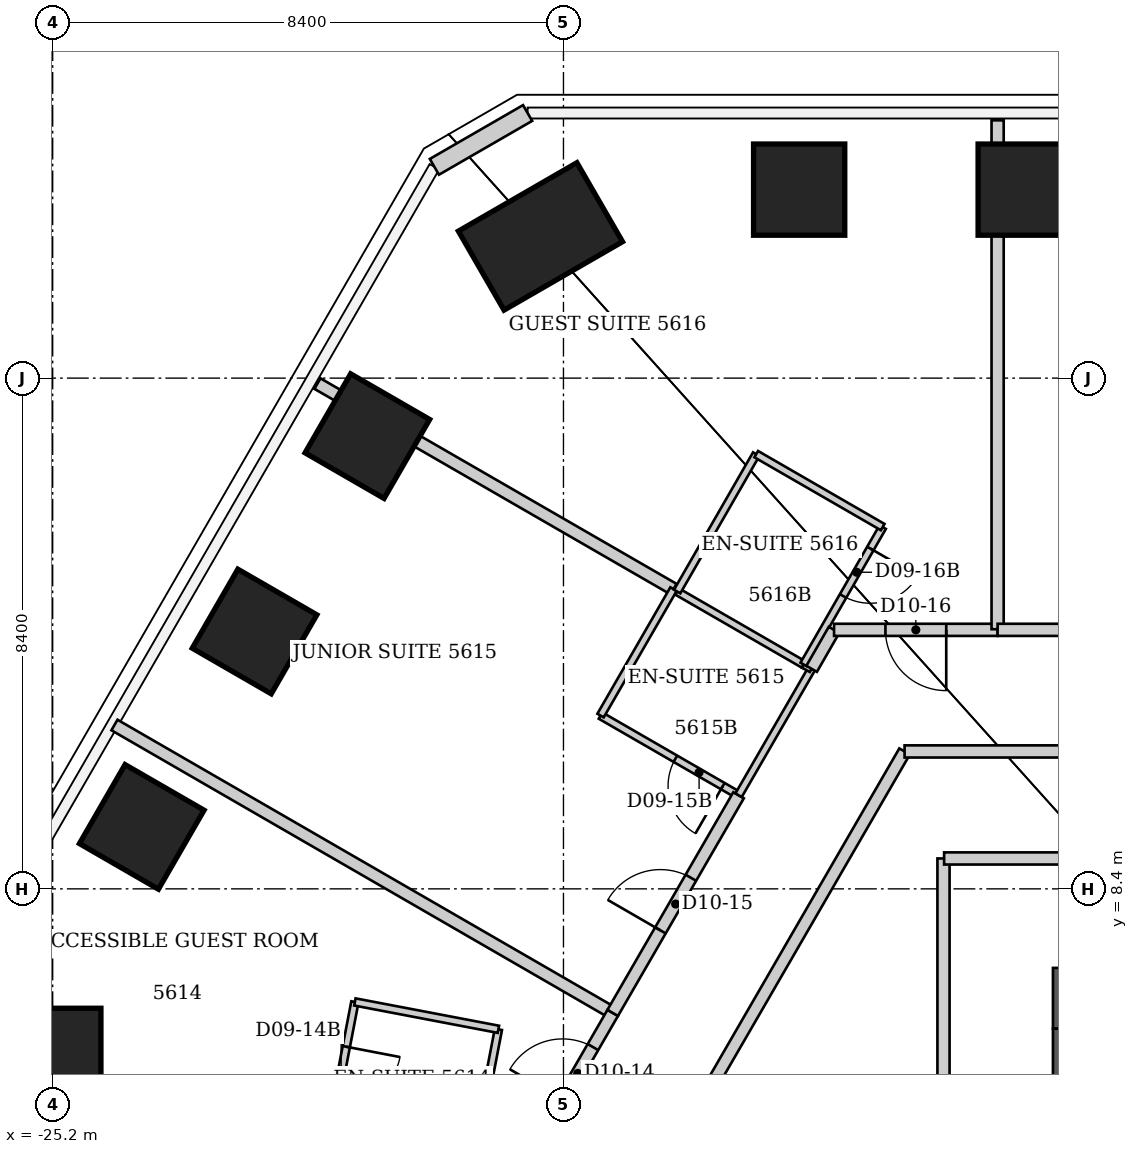
"""IFC4 building model, lengths in metres.
Left out: names, types, materials, properties, quantities, classifications, styles, units other than length and angle.
Written with IfcOpenShell. Run it as: python <this file> out.ifc"""

import sys

from ifc_helpers import new_model, si_unit, direction, frame, frame_2d, origin, origin_2d, place, context, subcontext, project, spatial, rectangle, extrude, element, fill, save


model = new_model("IFC4")
c1 = context("Model", 3, precision=1e-05, world=origin(), true_north=direction((0.0, 1.0)))
c2 = subcontext(c1, "Body", "Model", "MODEL_VIEW")
j1 = project(units=[si_unit("LENGTHUNIT", "METRE"), si_unit("PLANEANGLEUNIT", "RADIAN")], contexts=[c1])
p1 = place(None, origin())
s1 = spatial("IfcSite", under=j1, at=p1, CompositionType="ELEMENT")
p2 = place(p1, origin())
s2 = spatial("IfcBuilding", under=s1, at=p2, CompositionType="ELEMENT")
p3 = place(p2, frame((0.0, 0.0, 225.0)))
s3 = spatial("IfcBuildingStorey", under=s2, at=p3, CompositionType="ELEMENT", Elevation=225.0)
for number, where, z_axis, x_axis in (
    (1, (-12.924, 19.9, 0.0), (0.0, 0.0, 1.0), (0.0, 1.0, 0.0)),
    (2, (-9.231, 19.9, 0.0), (0.0, 0.0, 1.0), (0.0, 1.0, 0.0)),
):
    element("IfcColumn", number, at=place(p3, frame(where, z_axis=z_axis, x_axis=x_axis)), inside=s3, PredefinedType="COLUMN", context=c2, shape_type="SweptSolid", body=[
        extrude(rectangle(XDim=1.5, YDim=1.5, at=origin_2d()), origin(), (0.0, 0.0, 1.0), 3.8),
    ])
p4 = place(p3, frame((-25.156, 5.311, 0.0), z_axis=(0.0, 0.0, 1.0), x_axis=(-1.0, 0.0, 0.0)))
e3 = element("IfcColumn", 3, at=p4, inside=s3, PredefinedType="COLUMN", context=c2, shape_type="SweptSolid", body=[
    extrude(rectangle(XDim=1.5, YDim=2.25, at=origin_2d()), origin(), (0.0, 0.0, 1.0), 3.8),
])
for number, where, z_axis, x_axis in (
    (4, (-23.735, 9.419, 0.0), (0.0, 0.0, 1.0), (-0.866, 0.5, 0.0)),
    (5, (-21.88, 12.633, 0.0), (0.0, 0.0, 1.0), (-0.866, 0.5, 0.0)),
    (6, (-20.025, 15.846, 0.0), (0.0, 0.0, 1.0), (-0.866, 0.5, 0.0)),
):
    element("IfcColumn", number, at=place(p3, frame(where, z_axis=z_axis, x_axis=x_axis)), inside=s3, PredefinedType="COLUMN", context=c2, shape_type="SweptSolid", body=[
        extrude(rectangle(XDim=1.5, YDim=1.5, at=origin_2d()), origin(), (0.0, 0.0, 1.0), 3.8),
    ])
p5 = place(p3, frame((-17.178, 19.131, 0.0), z_axis=(0.0, 0.0, 1.0), x_axis=(-0.5, 0.866025403784, 0.0)))
e7 = element("IfcColumn", 7, at=p5, inside=s3, PredefinedType="COLUMN", context=c2, shape_type="SweptSolid", body=[
    extrude(rectangle(XDim=1.5, YDim=2.25, at=origin_2d()), origin(), (0.0, 0.0, 1.0), 3.8),
])
p6 = place(p3, frame((-8.75, 6.6, 0.0), z_axis=(0.0, 0.0, 1.0), x_axis=(1.0, 0.0, 0.0)))
e8 = element("IfcWall", 8, at=p6, inside=s3, PredefinedType="SHEAR", context=c2, shape_type="SweptSolid", body=[
    extrude(rectangle(XDim=17.5, YDim=1.0, at=frame_2d((8.75, 0.0))), origin(), (0.0, 0.0, 1.0), 3.8),
])
p7 = place(p6, frame((6.887, 0.0, 0.0)))
e9 = element("IfcOpeningElement", 9, at=p7, cuts=e8, PredefinedType="OPENING", context=c2, shape_type="SweptSolid", body=[
    extrude(rectangle(XDim=1.1, YDim=2.1, at=frame_2d((0.55, 1.05))), frame((0.0, 0.5, 0.0), z_axis=(0.0, -1.0, 0.0), x_axis=(1.0, 0.0, 0.0)), (0.0, 0.0, 1.0), 1.0),
])
p8 = place(p6, frame((9.512, 0.0, 0.0)))
e10 = element("IfcOpeningElement", 10, at=p8, cuts=e8, PredefinedType="OPENING", context=c2, shape_type="SweptSolid", body=[
    extrude(rectangle(XDim=1.1, YDim=2.1, at=frame_2d((0.55, 1.05))), frame((0.0, 0.5, 0.0), z_axis=(0.0, -1.0, 0.0), x_axis=(1.0, 0.0, 0.0)), (0.0, 0.0, 1.0), 1.0),
])
p9 = place(p6, frame((12.137, 0.0, 0.0)))
e11 = element("IfcOpeningElement", 11, at=p9, cuts=e8, PredefinedType="OPENING", context=c2, shape_type="SweptSolid", body=[
    extrude(rectangle(XDim=1.1, YDim=2.1, at=frame_2d((0.55, 1.05))), frame((0.0, 0.5, 0.0), z_axis=(0.0, -1.0, 0.0), x_axis=(1.0, 0.0, 0.0)), (0.0, 0.0, 1.0), 1.0),
])
p10 = place(p6, frame((14.762, 0.0, 0.0)))
e12 = element("IfcOpeningElement", 12, at=p10, cuts=e8, PredefinedType="OPENING", context=c2, shape_type="SweptSolid", body=[
    extrude(rectangle(XDim=1.1, YDim=2.1, at=frame_2d((0.55, 1.05))), frame((0.0, 0.5, 0.0), z_axis=(0.0, -1.0, 0.0), x_axis=(1.0, 0.0, 0.0)), (0.0, 0.0, 1.0), 1.0),
])
p11 = place(p3, frame((-8.25, -6.1, 0.0), z_axis=(0.0, 0.0, 1.0), x_axis=(0.0, 1.0, 0.0)))
e13 = element("IfcWall", 13, at=p11, inside=s3, PredefinedType="SHEAR", context=c2, shape_type="SweptSolid", body=[
    extrude(rectangle(XDim=12.2, YDim=1.0, at=frame_2d((6.1, 0.0))), origin(), (0.0, 0.0, 1.0), 3.8),
])
p12 = place(p11, frame((7.6, 0.0, 0.0)))
e14 = element("IfcOpeningElement", 14, at=p12, cuts=e13, PredefinedType="OPENING", context=c2, shape_type="SweptSolid", body=[
    extrude(rectangle(XDim=1.2, YDim=2.2, at=frame_2d((0.6, 1.1))), frame((0.0, 0.5, 0.0), z_axis=(0.0, -1.0, 0.0), x_axis=(1.0, 0.0, 0.0)), (0.0, 0.0, 1.0), 1.0),
])
p13 = place(p3, frame((-18.923, 20.275, 0.0), z_axis=(0.0, 0.0, 1.0), x_axis=(0.866036293601, 0.499981137809, 0.0)))
e15 = element("IfcWall", 15, at=p13, inside=s3, PredefinedType="SOLIDWALL", context=c2, shape_type="SweptSolid", body=[
    extrude(rectangle(XDim=1.77, YDim=0.3, at=frame_2d((0.885, 0.0))), origin(), (0.0, 0.0, 1.0), 3.64),
])
p14 = place(p3, frame((-24.184, 11.095, 0.0), z_axis=(0.0, 0.0, 1.0), x_axis=(0.865833251631, -0.500332669702, 0.0)))
e16 = element("IfcWall", 16, at=p14, inside=s3, PredefinedType="PARTITIONING", context=c2, shape_type="SweptSolid", body=[
    extrude(rectangle(XDim=9.454, YDim=0.2, at=frame_2d((4.727, 0.0))), origin(), (0.0, 0.0, 1.0), 3.64),
])
p15 = place(p3, frame((-20.846, 16.71, 0.0), z_axis=(0.0, 0.0, 1.0), x_axis=(0.866102018567, -0.499867275818, 0.0)))
e17 = element("IfcWall", 17, at=p15, inside=s3, PredefinedType="PARTITIONING", context=c2, shape_type="SweptSolid", body=[
    extrude(rectangle(XDim=6.761, YDim=0.2, at=frame_2d((3.381, 0.0))), origin(), (0.0, 0.0, 1.0), 3.64),
])
p16 = place(p3, frame((-20.23, 6.54, 0.0), z_axis=(0.0, 0.0, 1.0), x_axis=(-0.188697442844, -0.982035271802, 0.0)))
e18 = element("IfcWall", 18, at=p16, inside=s3, PredefinedType="PARTITIONING", context=c2, shape_type="SweptSolid", body=[
    extrude(rectangle(XDim=2.597, YDim=0.12, at=frame_2d((1.298, 0.0))), origin(), (0.0, 0.0, 1.0), 3.64),
])
p17 = place(p16, frame((0.75, 0.0, 0.0)))
e19 = element("IfcOpeningElement", 19, at=p17, cuts=e18, PredefinedType="OPENING", context=c2, shape_type="SweptSolid", body=[
    extrude(rectangle(XDim=0.9, YDim=2.03, at=frame_2d((0.45, 1.015))), frame((0.0, 0.06, 0.0), z_axis=(0.0, -1.0, 0.0), x_axis=(1.0, 0.0, 0.0)), (0.0, 0.0, 1.0), 0.12),
])
p18 = place(p3, frame((-18.36, 3.54, 0.0), z_axis=(0.0, 0.0, 1.0), x_axis=(0.188788112352, 0.982017845375, 0.0)))
e20 = element("IfcWall", 20, at=p18, inside=s3, PredefinedType="PARTITIONING", context=c2, shape_type="SweptSolid", body=[
    extrude(rectangle(XDim=2.597, YDim=0.12, at=frame_2d((1.298, 0.0))), origin(), (0.0, 0.0, 1.0), 3.64),
])
p19 = place(p3, frame((-17.87, 6.09, 0.0), z_axis=(0.0, 0.0, 1.0), x_axis=(-0.982303859288, 0.187294228499, 0.0)))
e21 = element("IfcWall", 21, at=p19, inside=s3, PredefinedType="PARTITIONING", context=c2, shape_type="SweptSolid", body=[
    extrude(rectangle(XDim=2.402, YDim=0.12, at=frame_2d((1.201, 0.0))), origin(), (0.0, 0.0, 1.0), 3.64),
])
p20 = place(p3, frame((-17.14, 4.37, 0.0), z_axis=(0.0, 0.0, 1.0), x_axis=(0.500320071569, 0.865840531498, 0.0)))
e22 = element("IfcWall", 22, at=p20, inside=s3, PredefinedType="PARTITIONING", context=c2, shape_type="SweptSolid", body=[
    extrude(rectangle(XDim=2.298, YDim=0.2, at=frame_2d((1.149, 0.0))), origin(), (0.0, 0.0, 1.0), 3.64),
])
p21 = place(p20, frame((0.649, 0.0, 0.0)))
e23 = element("IfcOpeningElement", 23, at=p21, cuts=e22, PredefinedType="OPENING", context=c2, shape_type="SweptSolid", body=[
    extrude(rectangle(XDim=1.0, YDim=2.13, at=frame_2d((0.5, 1.065))), frame((0.0, 0.1, 0.0), z_axis=(0.0, -1.0, 0.0), x_axis=(1.0, 0.0, 0.0)), (0.0, 0.0, 1.0), 0.2),
])
p22 = place(p3, frame((-16.19, 11.25, 0.0), z_axis=(0.0, 0.0, 1.0), x_axis=(0.866114241029, -0.499846097802, 0.0)))
e24 = element("IfcWall", 24, at=p22, inside=s3, PredefinedType="PARTITIONING", context=c2, shape_type="SweptSolid", body=[
    extrude(rectangle(XDim=2.621, YDim=0.12, at=frame_2d((1.311, 0.0))), origin(), (0.0, 0.0, 1.0), 3.64),
])
p23 = place(p22, frame((1.421, 0.0, 0.0)))
e25 = element("IfcOpeningElement", 25, at=p23, cuts=e24, PredefinedType="OPENING", context=c2, shape_type="SweptSolid", body=[
    extrude(rectangle(XDim=0.9, YDim=2.03, at=frame_2d((0.45, 1.015))), frame((0.0, 0.06, 0.0), z_axis=(0.0, -1.0, 0.0), x_axis=(1.0, 0.0, 0.0)), (0.0, 0.0, 1.0), 0.12),
])
p24 = place(p3, frame((-15.99, 6.36, 0.0), z_axis=(0.0, 0.0, 1.0), x_axis=(0.500589371231, 0.865684862644, 0.0)))
e26 = element("IfcWall", 26, at=p24, inside=s3, PredefinedType="PARTITIONING", context=c2, shape_type="SweptSolid", body=[
    extrude(rectangle(XDim=4.135, YDim=0.2, at=frame_2d((2.068, 0.0))), origin(), (0.0, 0.0, 1.0), 3.64),
])
p25 = place(p24, frame((1.568, 0.0, 0.0)))
e27 = element("IfcOpeningElement", 27, at=p25, cuts=e26, PredefinedType="OPENING", context=c2, shape_type="SweptSolid", body=[
    extrude(rectangle(XDim=1.0, YDim=2.13, at=frame_2d((0.5, 1.065))), frame((0.0, 0.1, 0.0), z_axis=(0.0, -1.0, 0.0), x_axis=(1.0, 0.0, 0.0)), (0.0, 0.0, 1.0), 0.2),
])
p26 = place(p3, frame((-14.99, 13.33, 0.0), z_axis=(0.0, 0.0, 1.0), x_axis=(-0.499693115345, -0.866202511239, 0.0)))
e28 = element("IfcWall", 28, at=p26, inside=s3, PredefinedType="PARTITIONING", context=c2, shape_type="SweptSolid", body=[
    extrude(rectangle(XDim=2.401, YDim=0.12, at=frame_2d((1.201, 0.0))), origin(), (0.0, 0.0, 1.0), 3.64),
])
p27 = place(p3, frame((-14.93, 13.29, 0.0), z_axis=(0.0, 0.0, 1.0), x_axis=(0.866177122335, -0.499737123639, 0.0)))
e29 = element("IfcWall", 29, at=p27, inside=s3, PredefinedType="PARTITIONING", context=c2, shape_type="SweptSolid", body=[
    extrude(rectangle(XDim=2.401, YDim=0.12, at=frame_2d((1.201, 0.0))), origin(), (0.0, 0.0, 1.0), 3.64),
])
p28 = place(p3, frame((-14.83, 4.37, 0.0), z_axis=(0.0, 0.0, 1.0), x_axis=(0.500899863475, 0.865505243642, 0.0)))
e30 = element("IfcWall", 30, at=p28, inside=s3, PredefinedType="PARTITIONING", context=c2, shape_type="SweptSolid", body=[
    extrude(rectangle(XDim=7.267, YDim=0.2, at=frame_2d((3.634, 0.0))), origin(), (0.0, 0.0, 1.0), 3.64),
])
p29 = place(p3, frame((-13.92, 9.94, 0.0), z_axis=(0.0, 0.0, 1.0), x_axis=(0.500402934999, 0.865792644139, 0.0)))
e31 = element("IfcWall", 31, at=p29, inside=s3, PredefinedType="PARTITIONING", context=c2, shape_type="SweptSolid", body=[
    extrude(rectangle(XDim=2.401, YDim=0.12, at=frame_2d((1.201, 0.0))), origin(), (0.0, 0.0, 1.0), 3.64),
])
p30 = place(p3, frame((-13.63, 15.55, 0.0), z_axis=(0.0, 0.0, 1.0), x_axis=(-0.498627694264, -0.866816256489, 0.0)))
e32 = element("IfcWall", 32, at=p30, inside=s3, PredefinedType="PARTITIONING", context=c2, shape_type="SweptSolid", body=[
    extrude(rectangle(XDim=2.607, YDim=0.12, at=frame_2d((1.304, 0.0))), origin(), (0.0, 0.0, 1.0), 3.64),
])
p31 = place(p3, frame((-12.85, 12.09, 0.0), z_axis=(0.0, 0.0, 1.0), x_axis=(0.880471099922, -0.474099823035, 0.0)))
e33 = element("IfcWall", 33, at=p31, inside=s3, PredefinedType="PARTITIONING", context=c2, shape_type="SweptSolid", body=[
    extrude(rectangle(XDim=0.148, YDim=0.12, at=frame_2d((0.074, 0.0))), origin(), (0.0, 0.0, 1.0), 3.64),
])
p32 = place(p3, frame((-12.85, 12.09, 0.0), z_axis=(0.0, 0.0, 1.0), x_axis=(0.498627694264, 0.866816256489, 0.0)))
e34 = element("IfcWall", 34, at=p32, inside=s3, PredefinedType="PARTITIONING", context=c2, shape_type="SweptSolid", body=[
    extrude(rectangle(XDim=2.607, YDim=0.12, at=frame_2d((1.304, 0.0))), origin(), (0.0, 0.0, 1.0), 3.64),
])
p33 = place(p32, frame((1.3, 0.0, 0.0)))
e35 = element("IfcOpeningElement", 35, at=p33, cuts=e34, PredefinedType="OPENING", context=c2, shape_type="SweptSolid", body=[
    extrude(rectangle(XDim=0.9, YDim=2.03, at=frame_2d((0.45, 1.015))), frame((0.0, 0.06, 0.0), z_axis=(0.0, -1.0, 0.0), x_axis=(1.0, 0.0, 0.0)), (0.0, 0.0, 1.0), 0.12),
])
p34 = place(p3, frame((-12.718, 12.019, 0.0), z_axis=(0.0, 0.0, 1.0), x_axis=(0.498129744856, 0.867102506795, 0.0)))
e36 = element("IfcWall", 36, at=p34, inside=s3, PredefinedType="PARTITIONING", context=c2, shape_type="SweptSolid", body=[
    extrude(rectangle(XDim=0.739, YDim=0.2, at=frame_2d((0.37, 0.0))), origin(), (0.0, 0.0, 1.0), 3.64),
])
p35 = place(p3, frame((-11.55, 14.35, 0.0), z_axis=(0.0, 0.0, 1.0), x_axis=(-0.866177122335, 0.499737123639, 0.0)))
e37 = element("IfcWall", 37, at=p35, inside=s3, PredefinedType="PARTITIONING", context=c2, shape_type="SweptSolid", body=[
    extrude(rectangle(XDim=2.401, YDim=0.12, at=frame_2d((1.201, 0.0))), origin(), (0.0, 0.0, 1.0), 3.64),
])
p36 = place(p3, frame((-11.19, 10.66, 0.0), z_axis=(0.0, 0.0, 1.0), x_axis=(1.0, 0.0, 0.0)))
e38 = element("IfcWall", 38, at=p36, inside=s3, PredefinedType="PARTITIONING", context=c2, shape_type="SweptSolid", body=[
    extrude(rectangle(XDim=6.59, YDim=0.2, at=frame_2d((3.295, 0.0))), origin(), (0.0, 0.0, 1.0), 3.64),
])
p37 = place(p3, frame((-10.55, 8.9, 0.0), z_axis=(0.0, 0.0, 1.0), x_axis=(0.0, -1.0, 0.0)))
e39 = element("IfcWall", 39, at=p37, inside=s3, PredefinedType="PARTITIONING", context=c2, shape_type="SweptSolid", body=[
    extrude(rectangle(XDim=11.95, YDim=0.2, at=frame_2d((5.975, 0.0))), origin(), (0.0, 0.0, 1.0), 3.64),
])
p38 = place(p37, frame((5.425, 0.0, 0.0)))
e40 = element("IfcOpeningElement", 40, at=p38, cuts=e39, PredefinedType="OPENING", context=c2, shape_type="SweptSolid", body=[
    extrude(rectangle(XDim=1.1, YDim=2.2, at=frame_2d((0.55, 1.1))), frame((0.0, 0.1, 0.0), z_axis=(0.0, -1.0, 0.0), x_axis=(1.0, 0.0, 0.0)), (0.0, 0.0, 1.0), 0.2),
])
p39 = place(p3, frame((-9.66, 12.66, 0.0), z_axis=(0.0, 0.0, 1.0), x_axis=(-1.0, 0.0, 0.0)))
e41 = element("IfcWall", 41, at=p39, inside=s3, PredefinedType="PARTITIONING", context=c2, shape_type="SweptSolid", body=[
    extrude(rectangle(XDim=2.69, YDim=0.2, at=frame_2d((1.345, 0.0))), origin(), (0.0, 0.0, 1.0), 3.64),
])
p40 = place(p39, frame((0.845, 0.0, 0.0)))
e42 = element("IfcOpeningElement", 42, at=p40, cuts=e41, PredefinedType="OPENING", context=c2, shape_type="SweptSolid", body=[
    extrude(rectangle(XDim=1.0, YDim=2.13, at=frame_2d((0.5, 1.065))), frame((0.0, 0.1, 0.0), z_axis=(0.0, -1.0, 0.0), x_axis=(1.0, 0.0, 0.0)), (0.0, 0.0, 1.0), 0.2),
])
p41 = place(p3, frame((-9.66, 12.67, 0.0), z_axis=(0.0, 0.0, 1.0), x_axis=(0.0, 1.0, 0.0)))
e43 = element("IfcWall", 43, at=p41, inside=s3, PredefinedType="PARTITIONING", context=c2, shape_type="SweptSolid", body=[
    extrude(rectangle(XDim=8.37, YDim=0.2, at=frame_2d((4.185, 0.0))), origin(), (0.0, 0.0, 1.0), 3.64),
])
p42 = place(p3, frame((-4.6, 8.9, 0.0), z_axis=(0.0, 0.0, 1.0), x_axis=(-1.0, 0.0, 0.0)))
e44 = element("IfcWall", 44, at=p42, inside=s3, PredefinedType="PARTITIONING", context=c2, shape_type="SweptSolid", body=[
    extrude(rectangle(XDim=5.94, YDim=0.2, at=frame_2d((2.97, 0.0))), origin(), (0.0, 0.0, 1.0), 3.64),
])
p43 = place(p3, frame((-1.93, 12.66, 0.0), z_axis=(0.0, 0.0, 1.0), x_axis=(-1.0, 0.0, 0.0)))
e45 = element("IfcWall", 45, at=p43, inside=s3, PredefinedType="PARTITIONING", context=c2, shape_type="SweptSolid", body=[
    extrude(rectangle(XDim=7.73, YDim=0.2, at=frame_2d((3.865, 0.0))), origin(), (0.0, 0.0, 1.0), 3.64),
])
p44 = place(p43, frame((3.315, 0.0, 0.0)))
e46 = element("IfcOpeningElement", 46, at=p44, cuts=e45, PredefinedType="OPENING", context=c2, shape_type="SweptSolid", body=[
    extrude(rectangle(XDim=1.1, YDim=2.2, at=frame_2d((0.55, 1.1))), frame((0.0, 0.1, 0.0), z_axis=(0.0, -1.0, 0.0), x_axis=(1.0, 0.0, 0.0)), (0.0, 0.0, 1.0), 0.2),
])
p45 = place(p21, origin())
e47 = element("IfcDoor", 47, at=p45, inside=s3, OperationType="SINGLE_SWING_LEFT", PredefinedType="DOOR", context=c2, shape_type="SweptSolid", body=[
    extrude(rectangle(XDim=1.0, YDim=2.13, at=frame_2d((0.5, 1.065))), frame((0.0, 0.025, 0.0), z_axis=(0.0, -1.0, 0.0), x_axis=(1.0, 0.0, 0.0)), (0.0, 0.0, 1.0), 0.05),
])
fill(e23, e47)
p46 = place(p17, origin())
e48 = element("IfcDoor", 48, at=p46, inside=s3, OperationType="SINGLE_SWING_LEFT", PredefinedType="DOOR", context=c2, shape_type="SweptSolid", body=[
    extrude(rectangle(XDim=0.9, YDim=2.03, at=frame_2d((0.45, 1.015))), frame((0.0, 0.025, 0.0), z_axis=(0.0, -1.0, 0.0), x_axis=(1.0, 0.0, 0.0)), (0.0, 0.0, 1.0), 0.05),
])
fill(e19, e48)
p47 = place(p25, origin())
e49 = element("IfcDoor", 49, at=p47, inside=s3, OperationType="SINGLE_SWING_LEFT", PredefinedType="DOOR", context=c2, shape_type="SweptSolid", body=[
    extrude(rectangle(XDim=1.0, YDim=2.13, at=frame_2d((0.5, 1.065))), frame((0.0, 0.025, 0.0), z_axis=(0.0, -1.0, 0.0), x_axis=(1.0, 0.0, 0.0)), (0.0, 0.0, 1.0), 0.05),
])
fill(e27, e49)
p48 = place(p23, origin())
e50 = element("IfcDoor", 50, at=p48, inside=s3, OperationType="SINGLE_SWING_RIGHT", PredefinedType="DOOR", context=c2, shape_type="SweptSolid", body=[
    extrude(rectangle(XDim=0.9, YDim=2.03, at=frame_2d((0.45, 1.015))), frame((0.0, 0.025, 0.0), z_axis=(0.0, -1.0, 0.0), x_axis=(1.0, 0.0, 0.0)), (0.0, 0.0, 1.0), 0.05),
])
fill(e25, e50)
p49 = place(p40, origin())
e51 = element("IfcDoor", 51, at=p49, inside=s3, OperationType="SINGLE_SWING_LEFT", PredefinedType="DOOR", context=c2, shape_type="SweptSolid", body=[
    extrude(rectangle(XDim=1.0, YDim=2.13, at=frame_2d((0.5, 1.065))), frame((0.0, 0.025, 0.0), z_axis=(0.0, -1.0, 0.0), x_axis=(1.0, 0.0, 0.0)), (0.0, 0.0, 1.0), 0.05),
])
fill(e42, e51)
p50 = place(p33, origin())
e52 = element("IfcDoor", 52, at=p50, inside=s3, OperationType="SINGLE_SWING_RIGHT", PredefinedType="DOOR", context=c2, shape_type="SweptSolid", body=[
    extrude(rectangle(XDim=0.9, YDim=2.03, at=frame_2d((0.45, 1.015))), frame((0.0, 0.025, 0.0), z_axis=(0.0, -1.0, 0.0), x_axis=(1.0, 0.0, 0.0)), (0.0, 0.0, 1.0), 0.05),
])
fill(e35, e52)
save(model, sys.argv[1])
